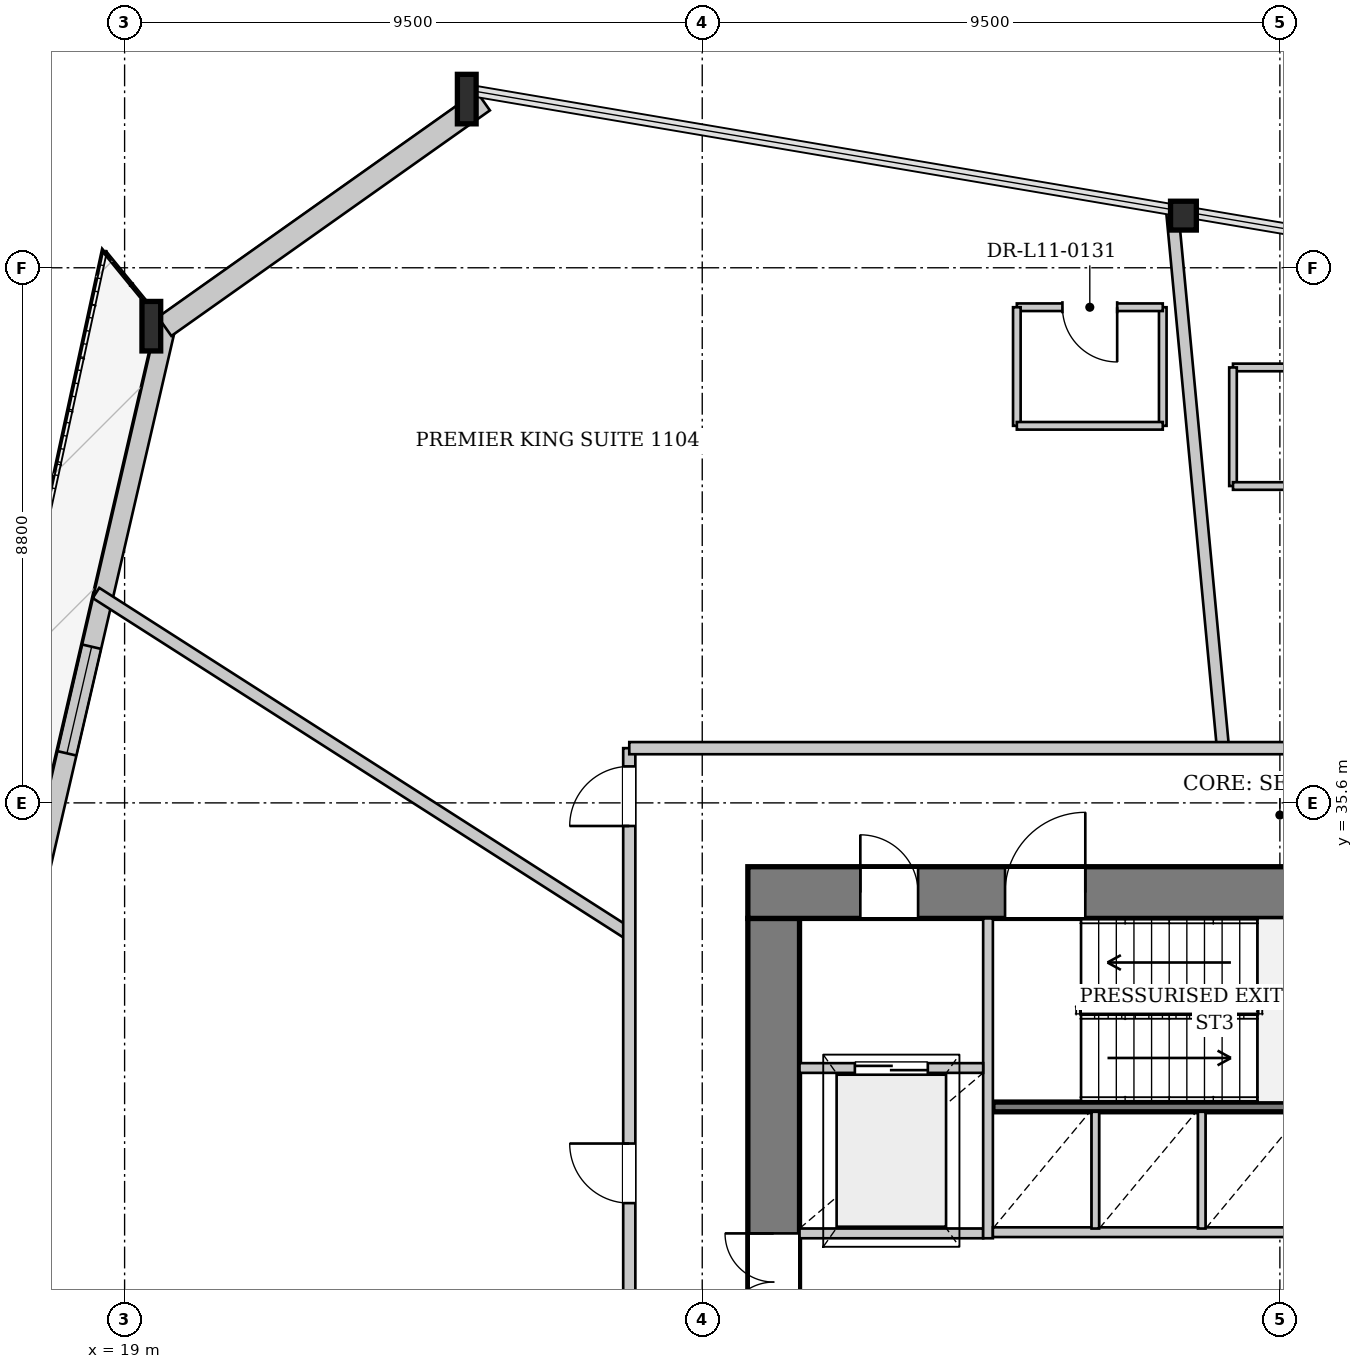
"""IFC4 building model, lengths in metres.
Left out: names, types, materials, properties, quantities, classifications, styles, units other than length and angle.
Written with IfcOpenShell. Run it as: python <this file> out.ifc"""

import sys

from ifc_helpers import new_model, si_unit, direction, frame, frame_2d, origin, origin_2d, place, context, subcontext, project, spatial, rectangle, i_section, extrude, source, transform, mapped, element, fill, save


model = new_model("IFC4")
c1 = context("Model", 3, precision=1e-05, world=origin(), true_north=direction((0.0, 1.0)))
c2 = subcontext(c1, "Body", "Model", "MODEL_VIEW")
j1 = project(units=[si_unit("LENGTHUNIT", "METRE"), si_unit("PLANEANGLEUNIT", "RADIAN")], contexts=[c1])
p1 = place(None, origin())
s1 = spatial("IfcSite", under=j1, at=p1, CompositionType="ELEMENT")
p2 = place(p1, origin())
s2 = spatial("IfcBuilding", under=s1, at=p2, CompositionType="ELEMENT")
p3 = place(p2, frame((0.0, 0.0, 47.05)))
s3 = spatial("IfcBuildingStorey", under=s2, at=p3, CompositionType="ELEMENT", Elevation=47.05)
m1 = source(origin(), c2, "Body", "SweptSolid", [
    extrude(i_section(OverallWidth=0.424, OverallDepth=0.474, WebThickness=0.043, FlangeThickness=0.068, at=origin_2d()), origin(), (0.0, 0.0, 1.0), 3.4),
])
p4 = place(p3, frame((36.57, 45.299, 0.0), z_axis=(-0.091686906918, -0.024411549219, 0.995488617396), x_axis=(0.257285839406, -0.966335343885, 0.0)))
e1 = element("IfcColumn", 1, at=p4, inside=s3, PredefinedType="COLUMN", context=c2, shape_type="MappedRepresentation", body=[
    mapped(m1, transform((0.0, 0.0, 0.0), x_axis=(1.0, 0.0, 0.0), y_axis=(0.0, 1.0, 0.0), z_axis=(0.0, 0.0, 1.0), scale=1.0)),
])
m2 = source(origin(), c2, "Body", "SweptSolid", [
    extrude(i_section(OverallWidth=0.308, OverallDepth=0.814, WebThickness=0.021, FlangeThickness=0.04, at=origin_2d()), origin(), (0.0, 0.0, 1.0), 3.409),
])
p5 = place(p3, frame((24.788, 47.298, 0.0), z_axis=(-0.094381115541, -0.072898312307, 0.99286355613), x_axis=(0.611276590314, -0.791417039325, 0.0)))
e2 = element("IfcColumn", 2, at=p5, inside=s3, PredefinedType="COLUMN", context=c2, shape_type="MappedRepresentation", body=[
    mapped(m2, transform((0.0, 0.0, 0.0), x_axis=(1.0, 0.0, 0.0), y_axis=(0.0, 1.0, 0.0), z_axis=(0.0, 0.0, 1.0), scale=1.0)),
])
m3 = source(origin(), c2, "Body", "SweptSolid", [
    extrude(i_section(OverallWidth=0.308, OverallDepth=0.814, WebThickness=0.021, FlangeThickness=0.04, at=origin_2d()), origin(), (0.0, 0.0, 1.0), 3.405),
])
p6 = place(p3, frame((19.55, 43.589, 0.0), z_axis=(-0.064667814066, -0.087824913781, 0.99403463639), x_axis=(0.805254059608, -0.592929927972, 0.0)))
e3 = element("IfcColumn", 3, at=p6, inside=s3, PredefinedType="COLUMN", context=c2, shape_type="MappedRepresentation", body=[
    mapped(m3, transform((0.0, 0.0, 0.0), x_axis=(1.0, 0.0, 0.0), y_axis=(0.0, 1.0, 0.0), z_axis=(0.0, 0.0, 1.0), scale=1.0)),
])
p7 = place(p3, frame((15.514, 25.465, 0.0), z_axis=(0.0, 0.0, 1.0), x_axis=(0.225730433285, 0.9741898026, 0.0)))
e4 = element("IfcWall", 4, at=p7, inside=s3, PredefinedType="SOLIDWALL", context=c2, shape_type="SweptSolid", body=[
    extrude(rectangle(XDim=18.567, YDim=0.32, at=frame_2d((9.284, 0.0))), origin(), (0.0, 0.0, 1.0), 2.592),
])
p8 = place(p7, frame((5.391, 0.0, 0.0)))
e5 = element("IfcOpeningElement", 5, at=p8, cuts=e4, PredefinedType="OPENING", context=c2, shape_type="SweptSolid", body=[
    extrude(rectangle(XDim=1.1, YDim=2.3, at=frame_2d((0.55, 1.15))), frame((0.0, 0.17, 0.0), z_axis=(0.0, -1.0, 0.0), x_axis=(1.0, 0.0, 0.0)), (0.0, 0.0, 1.0), 0.34),
])
p9 = place(p7, frame((11.24, 0.0, 0.272)))
e6 = element("IfcOpeningElement", 6, at=p9, cuts=e4, PredefinedType="OPENING", context=c2, shape_type="SweptSolid", body=[
    extrude(rectangle(XDim=1.8, YDim=2.2, at=frame_2d((0.9, 1.1))), frame((0.0, 0.17, 0.0), z_axis=(0.0, -1.0, 0.0), x_axis=(1.0, 0.0, 0.0)), (0.0, 0.0, 1.0), 0.34),
])
p10 = place(p3, frame((19.659, 43.434, 0.0), z_axis=(0.0, 0.0, 1.0), x_axis=(0.816108940035, 0.577898086167, 0.0)))
e7 = element("IfcWall", 7, at=p10, inside=s3, PredefinedType="SOLIDWALL", context=c2, shape_type="SweptSolid", body=[
    extrude(rectangle(XDim=6.419, YDim=0.38, at=frame_2d((3.209, 0.0))), origin(), (0.0, 0.0, 1.0), 2.592),
])
p11 = place(p3, frame((29.675, 19.5, 0.0), z_axis=(0.0, 0.0, 1.0), x_axis=(0.0, 1.0, 0.0)))
e8 = element("IfcWall", 8, at=p11, inside=s3, PredefinedType="SHEAR", context=c2, shape_type="SweptSolid", body=[
    extrude(rectangle(XDim=14.2, YDim=0.85, at=frame_2d((7.1, 0.0))), origin(), (0.0, 0.0, 1.0), 3.3),
])
p12 = place(p11, frame((7.42, 0.0, 0.0)))
e9 = element("IfcOpeningElement", 9, at=p12, cuts=e8, PredefinedType="OPENING", context=c2, shape_type="SweptSolid", body=[
    extrude(rectangle(XDim=1.6, YDim=2.2, at=frame_2d((0.8, 1.1))), frame((0.0, 0.435, 0.0), z_axis=(0.0, -1.0, 0.0), x_axis=(1.0, 0.0, 0.0)), (0.0, 0.0, 1.0), 0.87),
])
p13 = place(p3, frame((29.25, 34.125, 0.0), z_axis=(0.0, 0.0, 1.0), x_axis=(1.0, 0.0, 0.0)))
e10 = element("IfcWall", 10, at=p13, inside=s3, PredefinedType="SHEAR", context=c2, shape_type="SweptSolid", body=[
    extrude(rectangle(XDim=17.5, YDim=0.85, at=frame_2d((8.75, 0.0))), origin(), (0.0, 0.0, 1.0), 3.3),
])
p14 = place(p13, frame((1.85, 0.0, 0.0)))
e11 = element("IfcOpeningElement", 11, at=p14, cuts=e10, PredefinedType="OPENING", context=c2, shape_type="SweptSolid", body=[
    extrude(rectangle(XDim=0.95, YDim=2.1, at=frame_2d((0.475, 1.05))), frame((0.0, 0.435, 0.0), z_axis=(0.0, -1.0, 0.0), x_axis=(1.0, 0.0, 0.0)), (0.0, 0.0, 1.0), 0.87),
])
p15 = place(p13, frame((4.23, 0.0, 0.0)))
e12 = element("IfcOpeningElement", 12, at=p15, cuts=e10, PredefinedType="OPENING", context=c2, shape_type="SweptSolid", body=[
    extrude(rectangle(XDim=1.32, YDim=2.2, at=frame_2d((0.66, 1.1))), frame((0.0, 0.435, 0.0), z_axis=(0.0, -1.0, 0.0), x_axis=(1.0, 0.0, 0.0)), (0.0, 0.0, 1.0), 0.87),
])
p16 = place(p13, frame((15.3, 0.0, 0.0)))
e13 = element("IfcOpeningElement", 13, at=p16, cuts=e10, PredefinedType="OPENING", context=c2, shape_type="SweptSolid", body=[
    extrude(rectangle(XDim=0.95, YDim=2.1, at=frame_2d((0.475, 1.05))), frame((0.0, 0.435, 0.0), z_axis=(0.0, -1.0, 0.0), x_axis=(1.0, 0.0, 0.0)), (0.0, 0.0, 1.0), 0.87),
])
p17 = place(p3, frame((33.28, 30.6, 0.0), z_axis=(0.0, 0.0, 1.0), x_axis=(1.0, 0.0, 0.0)))
e14 = element("IfcWall", 14, at=p17, inside=s3, PredefinedType="PARTITIONING", context=c2, shape_type="SweptSolid", body=[
    extrude(rectangle(XDim=7.3, YDim=0.16, at=frame_2d((3.65, 0.0))), origin(), (0.0, 0.0, 1.0), 3.3),
])
p18 = place(p3, frame((30.1, 28.52, 0.0), z_axis=(0.0, 0.0, 1.0), x_axis=(1.0, 0.0, 0.0)))
e15 = element("IfcWall", 15, at=p18, inside=s3, PredefinedType="PARTITIONING", context=c2, shape_type="SweptSolid", body=[
    extrude(rectangle(XDim=3.02, YDim=0.16, at=frame_2d((1.51, 0.0))), origin(), (0.0, 0.0, 1.0), 3.3),
])
p19 = place(p3, frame((33.2, 28.44, 0.0), z_axis=(0.0, 0.0, 1.0), x_axis=(0.0, 1.0, 0.0)))
e16 = element("IfcWall", 16, at=p19, inside=s3, PredefinedType="PARTITIONING", context=c2, shape_type="SweptSolid", body=[
    extrude(rectangle(XDim=5.26, YDim=0.16, at=frame_2d((2.63, 0.0))), origin(), (0.0, 0.0, 1.0), 3.3),
])
p20 = place(p3, frame((30.1, 31.24, 0.0), z_axis=(0.0, 0.0, 1.0), x_axis=(1.0, 0.0, 0.0)))
e17 = element("IfcWall", 17, at=p20, inside=s3, PredefinedType="PARTITIONING", context=c2, shape_type="SweptSolid", body=[
    extrude(rectangle(XDim=3.02, YDim=0.16, at=frame_2d((1.51, 0.0))), origin(), (0.0, 0.0, 1.0), 3.3),
])
p21 = place(p20, frame((0.91, 0.0, 0.0)))
e18 = element("IfcOpeningElement", 18, at=p21, cuts=e17, PredefinedType="OPENING", context=c2, shape_type="SweptSolid", body=[
    extrude(rectangle(XDim=1.2, YDim=2.2, at=frame_2d((0.6, 1.1))), frame((0.0, 0.09, 0.0), z_axis=(0.0, -1.0, 0.0), x_axis=(1.0, 0.0, 0.0)), (0.0, 0.0, 1.0), 0.18),
])
p22 = place(p3, frame((33.28, 28.54, 0.0), z_axis=(0.0, 0.0, 1.0), x_axis=(1.0, 0.0, 0.0)))
e19 = element("IfcWall", 19, at=p22, inside=s3, PredefinedType="PARTITIONING", context=c2, shape_type="SweptSolid", body=[
    extrude(rectangle(XDim=12.62, YDim=0.16, at=frame_2d((6.31, 0.0))), origin(), (0.0, 0.0, 1.0), 3.3),
])
for number, where, z_axis, x_axis in (
    (20, (34.965, 28.6, 0.0), (0.0, 0.0, 1.0), (0.0, 1.0, 0.0)),
    (21, (36.715, 28.6, 0.0), (0.0, 0.0, 1.0), (0.0, 1.0, 0.0)),
):
    element("IfcWall", number, at=place(p3, frame(where, z_axis=z_axis, x_axis=x_axis)), inside=s3, PredefinedType="PARTITIONING", context=c2, shape_type="SweptSolid", body=[
        extrude(rectangle(XDim=1.92, YDim=0.125, at=frame_2d((0.96, 0.0))), origin(), (0.0, 0.0, 1.0), 3.3),
    ])
p23 = place(p3, frame((37.064, 36.5, 0.0), z_axis=(0.0, 0.0, 1.0), x_axis=(-0.094098210229, 0.995562919575, 0.0)))
e22 = element("IfcWall", 22, at=p23, inside=s3, PredefinedType="PARTITIONING", context=c2, shape_type="SweptSolid", body=[
    extrude(rectangle(XDim=8.865, YDim=0.2, at=frame_2d((4.433, 0.0))), origin(), (0.0, 0.0, 1.0), 3.3),
])
p24 = place(p3, frame((27.3, 33.443, 0.0), z_axis=(0.0, 0.0, 1.0), x_axis=(-0.842452354431, 0.538770851581, 0.0)))
e23 = element("IfcWall", 23, at=p24, inside=s3, PredefinedType="PARTITIONING", context=c2, shape_type="SweptSolid", body=[
    extrude(rectangle(XDim=10.411, YDim=0.2, at=frame_2d((5.206, 0.0))), origin(), (0.0, 0.0, 1.0), 3.3),
])
p25 = place(p3, frame((39.629, 42.761, 0.0), z_axis=(0.0, 0.0, 1.0), x_axis=(-1.0, 0.0, 0.0)))
e24 = element("IfcWall", 24, at=p25, inside=s3, PredefinedType="PARTITIONING", context=c2, shape_type="SweptSolid", body=[
    extrude(rectangle(XDim=2.4, YDim=0.125, at=frame_2d((1.2, 0.0))), origin(), (0.0, 0.0, 1.0), 3.3),
])
p26 = place(p3, frame((37.229, 42.761, 0.0), z_axis=(0.0, 0.0, 1.0), x_axis=(0.0, -1.0, 0.0)))
e25 = element("IfcWall", 25, at=p26, inside=s3, PredefinedType="PARTITIONING", context=c2, shape_type="SweptSolid", body=[
    extrude(rectangle(XDim=1.95, YDim=0.125, at=frame_2d((0.975, 0.0))), origin(), (0.0, 0.0, 1.0), 3.3),
])
p27 = place(p3, frame((37.229, 40.811, 0.0), z_axis=(0.0, 0.0, 1.0), x_axis=(1.0, 0.0, 0.0)))
e26 = element("IfcWall", 26, at=p27, inside=s3, PredefinedType="PARTITIONING", context=c2, shape_type="SweptSolid", body=[
    extrude(rectangle(XDim=2.4, YDim=0.125, at=frame_2d((1.2, 0.0))), origin(), (0.0, 0.0, 1.0), 3.3),
])
p28 = place(p3, frame((36.074, 41.801, 0.0), z_axis=(0.0, 0.0, 1.0), x_axis=(0.0, 1.0, 0.0)))
e27 = element("IfcWall", 27, at=p28, inside=s3, PredefinedType="PARTITIONING", context=c2, shape_type="SweptSolid", body=[
    extrude(rectangle(XDim=1.95, YDim=0.125, at=frame_2d((0.975, 0.0))), origin(), (0.0, 0.0, 1.0), 3.3),
])
p29 = place(p3, frame((36.074, 43.751, 0.0), z_axis=(0.0, 0.0, 1.0), x_axis=(-1.0, 0.0, 0.0)))
e28 = element("IfcWall", 28, at=p29, inside=s3, PredefinedType="PARTITIONING", context=c2, shape_type="SweptSolid", body=[
    extrude(rectangle(XDim=2.4, YDim=0.125, at=frame_2d((1.2, 0.0))), origin(), (0.0, 0.0, 1.0), 3.3),
])
p30 = place(p29, frame((0.75, 0.0, 0.0)))
e29 = element("IfcOpeningElement", 29, at=p30, cuts=e28, PredefinedType="OPENING", context=c2, shape_type="SweptSolid", body=[
    extrude(rectangle(XDim=0.9, YDim=2.1, at=frame_2d((0.45, 1.05))), frame((0.0, 0.073, 0.0), z_axis=(0.0, -1.0, 0.0), x_axis=(1.0, 0.0, 0.0)), (0.0, 0.0, 1.0), 0.145),
])
p31 = place(p3, frame((33.674, 43.751, 0.0), z_axis=(0.0, 0.0, 1.0), x_axis=(0.0, -1.0, 0.0)))
e30 = element("IfcWall", 30, at=p31, inside=s3, PredefinedType="PARTITIONING", context=c2, shape_type="SweptSolid", body=[
    extrude(rectangle(XDim=1.95, YDim=0.125, at=frame_2d((0.975, 0.0))), origin(), (0.0, 0.0, 1.0), 3.3),
])
p32 = place(p3, frame((33.674, 41.801, 0.0), z_axis=(0.0, 0.0, 1.0), x_axis=(1.0, 0.0, 0.0)))
e31 = element("IfcWall", 31, at=p32, inside=s3, PredefinedType="PARTITIONING", context=c2, shape_type="SweptSolid", body=[
    extrude(rectangle(XDim=2.4, YDim=0.125, at=frame_2d((1.2, 0.0))), origin(), (0.0, 0.0, 1.0), 3.3),
])
p33 = place(p3, frame((27.3, 16.7, 0.0), z_axis=(0.0, 0.0, 1.0), x_axis=(0.0, 1.0, 0.0)))
e32 = element("IfcWall", 32, at=p33, inside=s3, PredefinedType="PARTITIONING", context=c2, shape_type="SweptSolid", body=[
    extrude(rectangle(XDim=19.8, YDim=0.2, at=frame_2d((9.9, 0.0))), origin(), (0.0, 0.0, 1.0), 3.3),
])
p34 = place(p33, frame((18.52, 0.0, 0.0)))
e33 = element("IfcOpeningElement", 33, at=p34, cuts=e32, PredefinedType="OPENING", context=c2, shape_type="SweptSolid", body=[
    extrude(rectangle(XDim=0.98, YDim=2.15, at=frame_2d((0.49, 1.075))), frame((0.0, 0.11, 0.0), z_axis=(0.0, -1.0, 0.0), x_axis=(1.0, 0.0, 0.0)), (0.0, 0.0, 1.0), 0.22),
])
p35 = place(p33, frame((12.318, 0.0, 0.0)))
e34 = element("IfcOpeningElement", 34, at=p35, cuts=e32, PredefinedType="OPENING", context=c2, shape_type="SweptSolid", body=[
    extrude(rectangle(XDim=0.98, YDim=2.15, at=frame_2d((0.49, 1.075))), frame((0.0, 0.11, 0.0), z_axis=(0.0, -1.0, 0.0), x_axis=(1.0, 0.0, 0.0)), (0.0, 0.0, 1.0), 0.22),
])
p36 = place(p33, frame((0.3, 0.0, 0.0)))
e35 = element("IfcOpeningElement", 35, at=p36, cuts=e32, PredefinedType="OPENING", context=c2, shape_type="SweptSolid", body=[
    extrude(rectangle(XDim=0.98, YDim=2.15, at=frame_2d((0.49, 1.075))), frame((0.0, 0.11, 0.0), z_axis=(0.0, -1.0, 0.0), x_axis=(1.0, 0.0, 0.0)), (0.0, 0.0, 1.0), 0.22),
])
p37 = place(p3, frame((27.3, 36.5, 0.0), z_axis=(0.0, 0.0, 1.0), x_axis=(1.0, 0.0, 0.0)))
e36 = element("IfcWall", 36, at=p37, inside=s3, PredefinedType="PARTITIONING", context=c2, shape_type="SweptSolid", body=[
    extrude(rectangle(XDim=21.4, YDim=0.2, at=frame_2d((10.7, 0.0))), origin(), (0.0, 0.0, 1.0), 3.3),
])
p38 = place(p37, frame((17.909, 0.0, 0.0)))
e37 = element("IfcOpeningElement", 37, at=p38, cuts=e36, PredefinedType="OPENING", context=c2, shape_type="SweptSolid", body=[
    extrude(rectangle(XDim=0.98, YDim=2.15, at=frame_2d((0.49, 1.075))), frame((0.0, 0.11, 0.0), z_axis=(0.0, -1.0, 0.0), x_axis=(1.0, 0.0, 0.0)), (0.0, 0.0, 1.0), 0.22),
])
m4 = source(origin(), c2, "Body", "SweptSolid", [
    extrude(rectangle(XDim=1.8, YDim=2.2, at=frame_2d((0.9, 1.1))), frame((0.0, 0.03, 0.0), z_axis=(0.0, -1.0, 0.0), x_axis=(1.0, 0.0, 0.0)), (0.0, 0.0, 1.0), 0.06),
])
p39 = place(p9, origin())
e38 = element("IfcWindow", 38, at=p39, inside=s3, PartitioningType="SINGLE_PANEL", PredefinedType="WINDOW", context=c2, shape_type="MappedRepresentation", body=[
    mapped(m4, transform((0.0, 0.0, 0.0), x_axis=(1.0, 0.0, 0.0), y_axis=(0.0, 1.0, 0.0), z_axis=(0.0, 0.0, 1.0), scale=1.0)),
])
fill(e6, e38)
m5 = source(origin(), c2, "Body", "SweptSolid", [
    extrude(rectangle(XDim=1.6, YDim=2.2, at=frame_2d((0.8, 1.1))), frame((0.0, 0.025, 0.0), z_axis=(0.0, -1.0, 0.0), x_axis=(1.0, 0.0, 0.0)), (0.0, 0.0, 1.0), 0.05),
])
p40 = place(p12, origin())
e39 = element("IfcDoor", 39, at=p40, inside=s3, OperationType="DOUBLE_DOOR_SINGLE_SWING", PredefinedType="DOOR", context=c2, shape_type="MappedRepresentation", body=[
    mapped(m5, transform((0.0, 0.0, 0.0), x_axis=(1.0, 0.0, 0.0), y_axis=(0.0, 1.0, 0.0), z_axis=(0.0, 0.0, 1.0), scale=1.0)),
])
fill(e9, e39)
m6 = source(origin(), c2, "Body", "SweptSolid", [
    extrude(rectangle(XDim=0.95, YDim=2.1, at=frame_2d((0.475, 1.05))), frame((0.0, 0.025, 0.0), z_axis=(0.0, -1.0, 0.0), x_axis=(1.0, 0.0, 0.0)), (0.0, 0.0, 1.0), 0.05),
])
p41 = place(p14, origin())
e40 = element("IfcDoor", 40, at=p41, inside=s3, OperationType="SINGLE_SWING_LEFT", PredefinedType="DOOR", context=c2, shape_type="MappedRepresentation", body=[
    mapped(m6, transform((0.0, 0.0, 0.0), x_axis=(1.0, 0.0, 0.0), y_axis=(0.0, 1.0, 0.0), z_axis=(0.0, 0.0, 1.0), scale=1.0)),
])
fill(e11, e40)
m7 = source(origin(), c2, "Body", "SweptSolid", [
    extrude(rectangle(XDim=1.32, YDim=2.2, at=frame_2d((0.66, 1.1))), frame((0.0, 0.025, 0.0), z_axis=(0.0, -1.0, 0.0), x_axis=(1.0, 0.0, 0.0)), (0.0, 0.0, 1.0), 0.05),
])
p42 = place(p15, origin())
e41 = element("IfcDoor", 41, at=p42, inside=s3, OperationType="SINGLE_SWING_RIGHT", PredefinedType="DOOR", context=c2, shape_type="MappedRepresentation", body=[
    mapped(m7, transform((0.0, 0.0, 0.0), x_axis=(1.0, 0.0, 0.0), y_axis=(0.0, 1.0, 0.0), z_axis=(0.0, 0.0, 1.0), scale=1.0)),
])
fill(e12, e41)
m8 = source(origin(), c2, "Body", "SweptSolid", [
    extrude(rectangle(XDim=1.2, YDim=2.2, at=frame_2d((0.6, 1.1))), frame((0.0, 0.025, 0.0), z_axis=(0.0, -1.0, 0.0), x_axis=(1.0, 0.0, 0.0)), (0.0, 0.0, 1.0), 0.05),
])
p43 = place(p21, origin())
e42 = element("IfcDoor", 42, at=p43, inside=s3, OperationType="DOUBLE_DOOR_SLIDING", PredefinedType="DOOR", context=c2, shape_type="MappedRepresentation", body=[
    mapped(m8, transform((0.0, 0.0, 0.0), x_axis=(1.0, 0.0, 0.0), y_axis=(0.0, 1.0, 0.0), z_axis=(0.0, 0.0, 1.0), scale=1.0)),
])
fill(e18, e42)
m9 = source(origin(), c2, "Body", "SweptSolid", [
    extrude(rectangle(XDim=0.9, YDim=2.1, at=frame_2d((0.45, 1.05))), frame((0.0, 0.025, 0.0), z_axis=(0.0, -1.0, 0.0), x_axis=(1.0, 0.0, 0.0)), (0.0, 0.0, 1.0), 0.05),
])
p44 = place(p30, origin())
e43 = element("IfcDoor", 43, at=p44, inside=s3, OperationType="SINGLE_SWING_LEFT", PredefinedType="DOOR", context=c2, shape_type="MappedRepresentation", body=[
    mapped(m9, transform((0.0, 0.0, 0.0), x_axis=(1.0, 0.0, 0.0), y_axis=(0.0, 1.0, 0.0), z_axis=(0.0, 0.0, 1.0), scale=1.0)),
])
fill(e29, e43)
m10 = source(origin(), c2, "Body", "SweptSolid", [
    extrude(rectangle(XDim=0.98, YDim=2.15, at=frame_2d((0.49, 1.075))), frame((0.0, 0.025, 0.0), z_axis=(0.0, -1.0, 0.0), x_axis=(1.0, 0.0, 0.0)), (0.0, 0.0, 1.0), 0.05),
])
p45 = place(p34, origin())
e44 = element("IfcDoor", 44, at=p45, inside=s3, OperationType="SINGLE_SWING_LEFT", PredefinedType="DOOR", context=c2, shape_type="MappedRepresentation", body=[
    mapped(m10, transform((0.0, 0.0, 0.0), x_axis=(1.0, 0.0, 0.0), y_axis=(0.0, 1.0, 0.0), z_axis=(0.0, 0.0, 1.0), scale=1.0)),
])
fill(e33, e44)
p46 = place(p35, origin())
e45 = element("IfcDoor", 45, at=p46, inside=s3, OperationType="SINGLE_SWING_RIGHT", PredefinedType="DOOR", context=c2, shape_type="MappedRepresentation", body=[
    mapped(m10, transform((0.0, 0.0, 0.0), x_axis=(1.0, 0.0, 0.0), y_axis=(0.0, 1.0, 0.0), z_axis=(0.0, 0.0, 1.0), scale=1.0)),
])
fill(e34, e45)
save(model, sys.argv[1])
